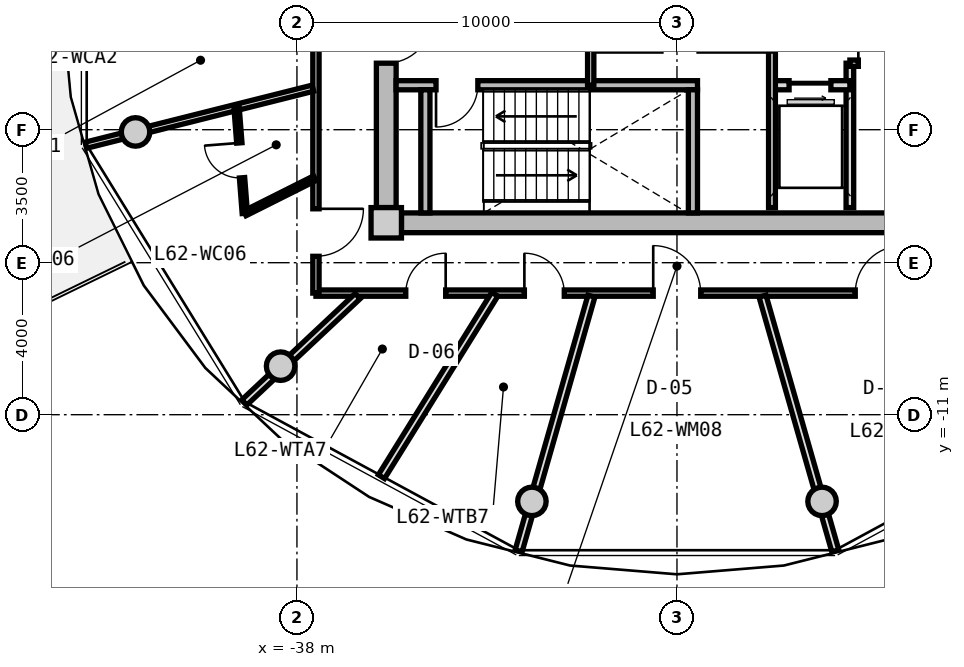
"""IFC4 building model, lengths in metres.
Left out: names, types, materials, properties, quantities, classifications, styles, units other than length and angle.
Written with IfcOpenShell. Run it as: python <this file> out.ifc"""

import sys

from ifc_helpers import new_model, si_unit, direction, frame, frame_2d, origin, origin_2d, place, context, subcontext, project, spatial, rectangle, circle, extrude, source, transform, mapped, element, fill, save


model = new_model("IFC4")
c1 = context("Model", 3, precision=1e-05, world=origin(), true_north=direction((0.0, 1.0)))
c2 = subcontext(c1, "Body", "Model", "MODEL_VIEW")
j1 = project(units=[si_unit("LENGTHUNIT", "METRE"), si_unit("PLANEANGLEUNIT", "RADIAN")], contexts=[c1])
p1 = place(None, origin())
s1 = spatial("IfcSite", under=j1, at=p1, CompositionType="ELEMENT")
p2 = place(p1, origin())
s2 = spatial("IfcBuilding", under=s1, at=p2, CompositionType="ELEMENT")
p3 = place(p2, frame((0.0, 0.0, 199.8)))
s3 = spatial("IfcBuildingStorey", under=s2, at=p3, CompositionType="ELEMENT", Elevation=199.8)
m1 = source(origin(), c2, "Body", "SweptSolid", [
    extrude(rectangle(XDim=0.8, YDim=0.8, at=origin_2d()), origin(), (0.0, 0.0, 1.0), 4.0),
])
p4 = place(p3, frame((-35.65, -5.95, 0.0), z_axis=(0.0, 0.0, 1.0), x_axis=(1.0, 0.0, 0.0)))
e1 = element("IfcColumn", 1, at=p4, inside=s3, PredefinedType="COLUMN", context=c2, shape_type="MappedRepresentation", body=[
    mapped(m1, transform((0.0, 0.0, 0.0), x_axis=(1.0, 0.0, 0.0), y_axis=(0.0, 1.0, 0.0), z_axis=(0.0, 0.0, 1.0), scale=1.0)),
])
m2 = source(origin(), c2, "Body", "SweptSolid", [
    extrude(rectangle(XDim=14.5, YDim=0.52, at=frame_2d((7.25, 0.0))), origin(), (0.0, 0.0, 1.0), 3.71),
])
p5 = place(p3, frame((-20.75, -5.95, 0.0), z_axis=(0.0, 0.0, 1.0), x_axis=(-1.0, 0.0, 0.0)))
e2 = element("IfcWall", 2, at=p5, inside=s3, PredefinedType="SHEAR", context=c2, shape_type="MappedRepresentation", body=[
    mapped(m2, transform((0.0, 0.0, 0.0), x_axis=(1.0, 0.0, 0.0), y_axis=(0.0, 1.0, 0.0), z_axis=(0.0, 0.0, 1.0), scale=1.0)),
])
m3 = source(origin(), c2, "Body", "SweptSolid", [
    extrude(rectangle(XDim=11.1, YDim=0.52, at=frame_2d((5.55, 0.0))), origin(), (0.0, 0.0, 1.0), 3.71),
])
p6 = place(p3, frame((-35.65, -5.55, 0.0), z_axis=(0.0, 0.0, 1.0), x_axis=(0.0, 1.0, 0.0)))
e3 = element("IfcWall", 3, at=p6, inside=s3, PredefinedType="SHEAR", context=c2, shape_type="MappedRepresentation", body=[
    mapped(m3, transform((0.0, 0.0, 0.0), x_axis=(1.0, 0.0, 0.0), y_axis=(0.0, 1.0, 0.0), z_axis=(0.0, 0.0, 1.0), scale=1.0)),
])
p7 = place(p6, frame((3.8, 0.0, 0.0)))
e4 = element("IfcOpeningElement", 4, at=p7, cuts=e3, PredefinedType="OPENING", context=c2, shape_type="SweptSolid", body=[
    extrude(rectangle(XDim=1.2, YDim=2.15, at=frame_2d((0.6, 1.075))), frame((0.0, 0.27, 0.0), z_axis=(0.0, -1.0, 0.0), x_axis=(1.0, 0.0, 0.0)), (0.0, 0.0, 1.0), 0.54),
])
m4 = source(origin(), c2, "Body", "SweptSolid", [
    extrude(circle(Radius=0.375, at=origin_2d()), origin(), (0.0, 0.0, 1.0), 4.0),
])
for number, where, z_axis, x_axis in (
    (5, (-42.247, -3.559, 0.0), (0.0, 0.0, 1.0), (1.0, 0.0, 0.0)),
    (6, (-38.43, -9.723, 0.0), (0.0, 0.0, 1.0), (1.0, 0.0, 0.0)),
    (7, (-31.818, -13.281, 0.0), (0.0, 0.0, 1.0), (1.0, 0.0, 0.0)),
    (8, (-24.182, -13.281, 0.0), (0.0, 0.0, 1.0), (1.0, 0.0, 0.0)),
):
    element("IfcColumn", number, at=place(p3, frame(where, z_axis=z_axis, x_axis=x_axis)), inside=s3, PredefinedType="COLUMN", context=c2, shape_type="MappedRepresentation", body=[
        mapped(m4, transform((0.0, 0.0, 0.0), x_axis=(1.0, 0.0, 0.0), y_axis=(0.0, 1.0, 0.0), z_axis=(0.0, 0.0, 1.0), scale=1.0)),
    ])
m5 = source(origin(), c2, "Body", "SweptSolid", [
    extrude(rectangle(XDim=7.93, YDim=0.24, at=frame_2d((3.965, 0.0))), origin(), (0.0, 0.0, 1.0), 3.71),
])
p8 = place(p3, frame((-35.39, -2.33, 0.0), z_axis=(0.0, 0.0, 1.0), x_axis=(1.0, 0.0, 0.0)))
e9 = element("IfcWall", 9, at=p8, inside=s3, PredefinedType="PARTITIONING", context=c2, shape_type="MappedRepresentation", body=[
    mapped(m5, transform((0.0, 0.0, 0.0), x_axis=(1.0, 0.0, 0.0), y_axis=(0.0, 1.0, 0.0), z_axis=(0.0, 0.0, 1.0), scale=1.0)),
])
p9 = place(p8, frame((1.05, 0.0, 0.0)))
e10 = element("IfcOpeningElement", 10, at=p9, cuts=e9, PredefinedType="OPENING", context=c2, shape_type="SweptSolid", body=[
    extrude(rectangle(XDim=1.1, YDim=2.15, at=frame_2d((0.55, 1.075))), frame((0.0, 0.13, 0.0), z_axis=(0.0, -1.0, 0.0), x_axis=(1.0, 0.0, 0.0)), (0.0, 0.0, 1.0), 0.26),
])
m6 = source(origin(), c2, "Body", "SweptSolid", [
    extrude(rectangle(XDim=3.24, YDim=0.24, at=frame_2d((1.62, 0.0))), origin(), (0.0, 0.0, 1.0), 3.71),
])
for number, where, z_axis, x_axis in (
    (11, (-34.62, -5.69, 0.0), (0.0, 0.0, 1.0), (0.0, 1.0, 0.0)),
    (12, (-27.58, -5.69, 0.0), (0.0, 0.0, 1.0), (0.0, 1.0, 0.0)),
):
    element("IfcWall", number, at=place(p3, frame(where, z_axis=z_axis, x_axis=x_axis)), inside=s3, PredefinedType="PARTITIONING", context=c2, shape_type="MappedRepresentation", body=[
        mapped(m6, transform((0.0, 0.0, 0.0), x_axis=(1.0, 0.0, 0.0), y_axis=(0.0, 1.0, 0.0), z_axis=(0.0, 0.0, 1.0), scale=1.0)),
    ])
m7 = source(origin(), c2, "Body", "SweptSolid", [
    extrude(rectangle(XDim=3.8, YDim=0.2, at=frame_2d((1.9, 0.0))), origin(), (0.0, 0.0, 1.0), 3.695),
])
p10 = place(p3, frame((-23.45, -5.55, 0.0), z_axis=(0.0, 0.0, 1.0), x_axis=(0.0, 1.0, 0.0)))
e13 = element("IfcWall", 13, at=p10, inside=s3, PredefinedType="PARTITIONING", context=c2, shape_type="MappedRepresentation", body=[
    mapped(m7, transform((0.0, 0.0, 0.0), x_axis=(1.0, 0.0, 0.0), y_axis=(0.0, 1.0, 0.0), z_axis=(0.0, 0.0, 1.0), scale=1.0)),
])
m8 = source(origin(), c2, "Body", "SweptSolid", [
    extrude(rectangle(XDim=2.05, YDim=0.24, at=frame_2d((1.025, 0.0))), origin(), (0.0, 0.0, 1.0), 3.695),
])
p11 = place(p3, frame((-25.5, -2.33, 0.0), z_axis=(0.0, 0.0, 1.0), x_axis=(1.0, 0.0, 0.0)))
e14 = element("IfcWall", 14, at=p11, inside=s3, PredefinedType="PARTITIONING", context=c2, shape_type="MappedRepresentation", body=[
    mapped(m8, transform((0.0, 0.0, 0.0), x_axis=(1.0, 0.0, 0.0), y_axis=(0.0, 1.0, 0.0), z_axis=(0.0, 0.0, 1.0), scale=1.0)),
])
p12 = place(p11, frame((0.45, 0.0, 0.0)))
e15 = element("IfcOpeningElement", 15, at=p12, cuts=e14, PredefinedType="OPENING", context=c2, shape_type="SweptSolid", body=[
    extrude(rectangle(XDim=1.1, YDim=2.2, at=frame_2d((0.55, 1.1))), frame((0.0, 0.13, 0.0), z_axis=(0.0, -1.0, 0.0), x_axis=(1.0, 0.0, 0.0)), (0.0, 0.0, 1.0), 0.26),
])
m9 = source(origin(), c2, "Body", "SweptSolid", [
    extrude(rectangle(XDim=4.2, YDim=0.18, at=frame_2d((2.1, 0.0))), origin(), (0.0, 0.0, 1.0), 3.695),
])
p13 = place(p3, frame((-25.5, -5.55, 0.0), z_axis=(0.0, 0.0, 1.0), x_axis=(0.0, 1.0, 0.0)))
e16 = element("IfcWall", 16, at=p13, inside=s3, PredefinedType="PARTITIONING", context=c2, shape_type="MappedRepresentation", body=[
    mapped(m9, transform((0.0, 0.0, 0.0), x_axis=(1.0, 0.0, 0.0), y_axis=(0.0, 1.0, 0.0), z_axis=(0.0, 0.0, 1.0), scale=1.0)),
])
m10 = source(origin(), c2, "Body", "SweptSolid", [
    extrude(rectangle(XDim=0.98, YDim=0.165, at=frame_2d((0.49, 0.0))), origin(), (0.0, 0.0, 1.0), 3.695),
])
p14 = place(p3, frame((-30.27, -2.33, 0.0), z_axis=(0.0, 0.0, 1.0), x_axis=(0.0, 1.0, 0.0)))
e17 = element("IfcWall", 17, at=p14, inside=s3, PredefinedType="PARTITIONING", context=c2, shape_type="MappedRepresentation", body=[
    mapped(m10, transform((0.0, 0.0, 0.0), x_axis=(1.0, 0.0, 0.0), y_axis=(0.0, 1.0, 0.0), z_axis=(0.0, 0.0, 1.0), scale=1.0)),
])
m11 = source(origin(), c2, "Body", "SweptSolid", [
    extrude(rectangle(XDim=2.7, YDim=0.165, at=frame_2d((1.35, 0.0))), origin(), (0.0, 0.0, 1.0), 3.695),
])
p15 = place(p3, frame((-23.45, -1.75, 0.0), z_axis=(0.0, 0.0, 1.0), x_axis=(1.0, 0.0, 0.0)))
e18 = element("IfcWall", 18, at=p15, inside=s3, PredefinedType="PARTITIONING", context=c2, shape_type="MappedRepresentation", body=[
    mapped(m11, transform((0.0, 0.0, 0.0), x_axis=(1.0, 0.0, 0.0), y_axis=(0.0, 1.0, 0.0), z_axis=(0.0, 0.0, 1.0), scale=1.0)),
])
p16 = place(p15, frame((0.222, 0.0, 0.0)))
e19 = element("IfcOpeningElement", 19, at=p16, cuts=e18, PredefinedType="OPENING", context=c2, shape_type="SweptSolid", body=[
    extrude(rectangle(XDim=0.925, YDim=2.1, at=frame_2d((0.462, 1.05))), frame((0.0, 0.093, 0.0), z_axis=(0.0, -1.0, 0.0), x_axis=(1.0, 0.0, 0.0)), (0.0, 0.0, 1.0), 0.185),
])
p17 = place(p15, frame((1.522, 0.0, 0.0)))
e20 = element("IfcOpeningElement", 20, at=p17, cuts=e18, PredefinedType="OPENING", context=c2, shape_type="SweptSolid", body=[
    extrude(rectangle(XDim=0.925, YDim=2.1, at=frame_2d((0.462, 1.05))), frame((0.0, 0.093, 0.0), z_axis=(0.0, -1.0, 0.0), x_axis=(1.0, 0.0, 0.0)), (0.0, 0.0, 1.0), 0.185),
])
m12 = source(origin(), c2, "Body", "SweptSolid", [
    extrude(rectangle(XDim=19.0, YDim=0.165, at=frame_2d((9.5, 0.0))), origin(), (0.0, 0.0, 1.0), 3.695),
])
p18 = place(p3, frame((-18.5, -7.8, 0.0), z_axis=(0.0, 0.0, 1.0), x_axis=(-1.0, 0.0, 0.0)))
e21 = element("IfcWall", 21, at=p18, inside=s3, PredefinedType="PARTITIONING", context=c2, shape_type="MappedRepresentation", body=[
    mapped(m12, transform((0.0, 0.0, 0.0), x_axis=(1.0, 0.0, 0.0), y_axis=(0.0, 1.0, 0.0), z_axis=(0.0, 0.0, 1.0), scale=1.0)),
])
p19 = place(p18, frame((15.586, 0.0, 0.0)))
e22 = element("IfcOpeningElement", 22, at=p19, cuts=e21, PredefinedType="OPENING", context=c2, shape_type="SweptSolid", body=[
    extrude(rectangle(XDim=1.05, YDim=2.15, at=frame_2d((0.525, 1.075))), frame((0.0, 0.093, 0.0), z_axis=(0.0, -1.0, 0.0), x_axis=(1.0, 0.0, 0.0)), (0.0, 0.0, 1.0), 0.185),
])
p20 = place(p18, frame((12.465, 0.0, 0.0)))
e23 = element("IfcOpeningElement", 23, at=p20, cuts=e21, PredefinedType="OPENING", context=c2, shape_type="SweptSolid", body=[
    extrude(rectangle(XDim=1.05, YDim=2.15, at=frame_2d((0.525, 1.075))), frame((0.0, 0.093, 0.0), z_axis=(0.0, -1.0, 0.0), x_axis=(1.0, 0.0, 0.0)), (0.0, 0.0, 1.0), 0.185),
])
p21 = place(p18, frame((8.875, 0.0, 0.0)))
e24 = element("IfcOpeningElement", 24, at=p21, cuts=e21, PredefinedType="OPENING", context=c2, shape_type="SweptSolid", body=[
    extrude(rectangle(XDim=1.25, YDim=2.2, at=frame_2d((0.625, 1.1))), frame((0.0, 0.093, 0.0), z_axis=(0.0, -1.0, 0.0), x_axis=(1.0, 0.0, 0.0)), (0.0, 0.0, 1.0), 0.185),
])
p22 = place(p18, frame((3.559, 0.0, 0.0)))
e25 = element("IfcOpeningElement", 25, at=p22, cuts=e21, PredefinedType="OPENING", context=c2, shape_type="SweptSolid", body=[
    extrude(rectangle(XDim=1.25, YDim=2.2, at=frame_2d((0.625, 1.1))), frame((0.0, 0.093, 0.0), z_axis=(0.0, -1.0, 0.0), x_axis=(1.0, 0.0, 0.0)), (0.0, 0.0, 1.0), 0.185),
])
m13 = source(origin(), c2, "Body", "SweptSolid", [
    extrude(rectangle(XDim=6.88, YDim=0.165, at=frame_2d((3.44, 0.0))), origin(), (0.0, 0.0, 1.0), 3.695),
])
p23 = place(p3, frame((-37.5, -7.8, 0.0), z_axis=(0.0, 0.0, 1.0), x_axis=(0.0, 1.0, 0.0)))
e26 = element("IfcWall", 26, at=p23, inside=s3, PredefinedType="PARTITIONING", context=c2, shape_type="MappedRepresentation", body=[
    mapped(m13, transform((0.0, 0.0, 0.0), x_axis=(1.0, 0.0, 0.0), y_axis=(0.0, 1.0, 0.0), z_axis=(0.0, 0.0, 1.0), scale=1.0)),
])
p24 = place(p23, frame((0.968, 0.0, 0.0)))
e27 = element("IfcOpeningElement", 27, at=p24, cuts=e26, PredefinedType="OPENING", context=c2, shape_type="SweptSolid", body=[
    extrude(rectangle(XDim=1.25, YDim=2.2, at=frame_2d((0.625, 1.1))), frame((0.0, 0.093, 0.0), z_axis=(0.0, -1.0, 0.0), x_axis=(1.0, 0.0, 0.0)), (0.0, 0.0, 1.0), 0.185),
])
m14 = source(origin(), c2, "Body", "SweptSolid", [
    extrude(rectangle(XDim=6.157, YDim=0.165, at=frame_2d((3.079, 0.0))), origin(), (0.0, 0.0, 1.0), 3.295),
])
p25 = place(p3, frame((-37.58, -2.407, 0.0), z_axis=(0.0, 0.0, 1.0), x_axis=(-0.969840867184, -0.243738984038, 0.0)))
e28 = element("IfcWall", 28, at=p25, inside=s3, PredefinedType="PARTITIONING", context=c2, shape_type="MappedRepresentation", body=[
    mapped(m14, transform((0.0, 0.0, 0.0), x_axis=(1.0, 0.0, 0.0), y_axis=(0.0, 1.0, 0.0), z_axis=(0.0, 0.0, 1.0), scale=1.0)),
])
m15 = source(origin(), c2, "Body", "SweptSolid", [
    extrude(rectangle(XDim=4.089, YDim=0.19, at=frame_2d((2.044, 0.0))), origin(), (0.0, 0.0, 1.0), 3.295),
])
p26 = place(p3, frame((-36.402, -7.88, 0.0), z_axis=(0.0, 0.0, 1.0), x_axis=(-0.729401273609, -0.684086092577, 0.0)))
e29 = element("IfcWall", 29, at=p26, inside=s3, PredefinedType="PARTITIONING", context=c2, shape_type="MappedRepresentation", body=[
    mapped(m15, transform((0.0, 0.0, 0.0), x_axis=(1.0, 0.0, 0.0), y_axis=(0.0, 1.0, 0.0), z_axis=(0.0, 0.0, 1.0), scale=1.0)),
])
m16 = source(origin(), c2, "Body", "SweptSolid", [
    extrude(rectangle(XDim=2.06, YDim=0.14, at=frame_2d((1.03, 0.0))), origin(), (0.0, 0.0, 1.0), 3.695),
])
p27 = place(p3, frame((-37.53, -4.778, 0.0), z_axis=(0.0, 0.0, 1.0), x_axis=(-0.893952568722, -0.448161583444, 0.0)))
e30 = element("IfcWall", 30, at=p27, inside=s3, PredefinedType="PARTITIONING", context=c2, shape_type="MappedRepresentation", body=[
    mapped(m16, transform((0.0, 0.0, 0.0), x_axis=(1.0, 0.0, 0.0), y_axis=(0.0, 1.0, 0.0), z_axis=(0.0, 0.0, 1.0), scale=1.0)),
])
m17 = source(origin(), c2, "Body", "SweptSolid", [
    extrude(rectangle(XDim=2.798, YDim=0.14, at=frame_2d((1.399, 0.0))), origin(), (0.0, 0.0, 1.0), 3.695),
])
p28 = place(p3, frame((-39.371, -5.701, 0.0), z_axis=(0.0, 0.0, 1.0), x_axis=(-0.077823984089, 0.996967114553, 0.0)))
e31 = element("IfcWall", 31, at=p28, inside=s3, PredefinedType="PARTITIONING", context=c2, shape_type="MappedRepresentation", body=[
    mapped(m17, transform((0.0, 0.0, 0.0), x_axis=(1.0, 0.0, 0.0), y_axis=(0.0, 1.0, 0.0), z_axis=(0.0, 0.0, 1.0), scale=1.0)),
])
p29 = place(p28, frame((0.939, 0.0, 0.0)))
e32 = element("IfcOpeningElement", 32, at=p29, cuts=e31, PredefinedType="OPENING", context=c2, shape_type="SweptSolid", body=[
    extrude(rectangle(XDim=0.92, YDim=2.1, at=frame_2d((0.46, 1.05))), frame((0.0, 0.08, 0.0), z_axis=(0.0, -1.0, 0.0), x_axis=(1.0, 0.0, 0.0)), (0.0, 0.0, 1.0), 0.16),
])
m18 = source(origin(), c2, "Body", "SweptSolid", [
    extrude(rectangle(XDim=6.974, YDim=0.19, at=frame_2d((3.487, 0.0))), origin(), (0.0, 0.0, 1.0), 3.295),
])
p30 = place(p3, frame((-30.251, -7.88, 0.0), z_axis=(0.0, 0.0, 1.0), x_axis=(-0.274707256801, -0.961527910703, 0.0)))
e33 = element("IfcWall", 33, at=p30, inside=s3, PredefinedType="PARTITIONING", context=c2, shape_type="MappedRepresentation", body=[
    mapped(m18, transform((0.0, 0.0, 0.0), x_axis=(1.0, 0.0, 0.0), y_axis=(0.0, 1.0, 0.0), z_axis=(0.0, 0.0, 1.0), scale=1.0)),
])
m19 = source(origin(), c2, "Body", "SweptSolid", [
    extrude(rectangle(XDim=5.652, YDim=0.19, at=frame_2d((2.826, 0.0))), origin(), (0.0, 0.0, 1.0), 3.695),
])
p31 = place(p3, frame((-32.794, -7.83, 0.0), z_axis=(0.0, 0.0, 1.0), x_axis=(-0.527566076956, -0.84951399897, 0.0)))
e34 = element("IfcWall", 34, at=p31, inside=s3, PredefinedType="PARTITIONING", context=c2, shape_type="MappedRepresentation", body=[
    mapped(m19, transform((0.0, 0.0, 0.0), x_axis=(1.0, 0.0, 0.0), y_axis=(0.0, 1.0, 0.0), z_axis=(0.0, 0.0, 1.0), scale=1.0)),
])
p32 = place(p3, frame((-25.749, -7.88, 0.0), z_axis=(0.0, 0.0, 1.0), x_axis=(0.274707256801, -0.961527910703, 0.0)))
e35 = element("IfcWall", 35, at=p32, inside=s3, PredefinedType="PARTITIONING", context=c2, shape_type="MappedRepresentation", body=[
    mapped(m18, transform((0.0, 0.0, 0.0), x_axis=(1.0, 0.0, 0.0), y_axis=(0.0, 1.0, 0.0), z_axis=(0.0, 0.0, 1.0), scale=1.0)),
])
m20 = source(origin(), c2, "Body", "SweptSolid", [
    extrude(rectangle(XDim=1.1, YDim=2.15, at=frame_2d((0.55, 1.075))), frame((0.0, 0.025, 0.0), z_axis=(0.0, -1.0, 0.0), x_axis=(1.0, 0.0, 0.0)), (0.0, 0.0, 1.0), 0.05),
])
p33 = place(p9, frame((1.1, 0.0, 0.0), z_axis=(0.0, 0.0, 1.0), x_axis=(-1.0, 0.0, 0.0)))
e36 = element("IfcDoor", 36, at=p33, inside=s3, OperationType="SINGLE_SWING_RIGHT", PredefinedType="DOOR", context=c2, shape_type="MappedRepresentation", body=[
    mapped(m20, transform((0.0, 0.0, 0.0), x_axis=(1.0, 0.0, 0.0), y_axis=(0.0, 1.0, 0.0), z_axis=(0.0, 0.0, 1.0), scale=1.0)),
])
fill(e10, e36)
m21 = source(origin(), c2, "Body", "SweptSolid", [
    extrude(rectangle(XDim=1.2, YDim=2.15, at=frame_2d((0.6, 1.075))), frame((0.0, 0.025, 0.0), z_axis=(0.0, -1.0, 0.0), x_axis=(1.0, 0.0, 0.0)), (0.0, 0.0, 1.0), 0.05),
])
p34 = place(p7, frame((1.2, 0.0, 0.0), z_axis=(0.0, 0.0, 1.0), x_axis=(-1.0, 0.0, 0.0)))
e37 = element("IfcDoor", 37, at=p34, inside=s3, OperationType="SINGLE_SWING_LEFT", PredefinedType="DOOR", context=c2, shape_type="MappedRepresentation", body=[
    mapped(m21, transform((0.0, 0.0, 0.0), x_axis=(1.0, 0.0, 0.0), y_axis=(0.0, 1.0, 0.0), z_axis=(0.0, 0.0, 1.0), scale=1.0)),
])
fill(e4, e37)
m22 = source(origin(), c2, "Body", "SweptSolid", [
    extrude(rectangle(XDim=1.1, YDim=2.2, at=frame_2d((0.55, 1.1))), frame((0.0, 0.025, 0.0), z_axis=(0.0, -1.0, 0.0), x_axis=(1.0, 0.0, 0.0)), (0.0, 0.0, 1.0), 0.05),
])
p35 = place(p12, frame((1.1, 0.0, 0.0), z_axis=(0.0, 0.0, 1.0), x_axis=(-1.0, 0.0, 0.0)))
e38 = element("IfcDoor", 38, at=p35, inside=s3, OperationType="SLIDING_TO_RIGHT", PredefinedType="DOOR", context=c2, shape_type="MappedRepresentation", body=[
    mapped(m22, transform((0.0, 0.0, 0.0), x_axis=(1.0, 0.0, 0.0), y_axis=(0.0, 1.0, 0.0), z_axis=(0.0, 0.0, 1.0), scale=1.0)),
])
fill(e15, e38)
m23 = source(origin(), c2, "Body", "SweptSolid", [
    extrude(rectangle(XDim=0.925, YDim=2.1, at=frame_2d((0.462, 1.05))), frame((0.0, 0.025, 0.0), z_axis=(0.0, -1.0, 0.0), x_axis=(1.0, 0.0, 0.0)), (0.0, 0.0, 1.0), 0.05),
])
p36 = place(p16, origin())
e39 = element("IfcDoor", 39, at=p36, inside=s3, OperationType="SINGLE_SWING_LEFT", PredefinedType="DOOR", context=c2, shape_type="MappedRepresentation", body=[
    mapped(m23, transform((0.0, 0.0, 0.0), x_axis=(1.0, 0.0, 0.0), y_axis=(0.0, 1.0, 0.0), z_axis=(0.0, 0.0, 1.0), scale=1.0)),
])
fill(e19, e39)
m24 = source(origin(), c2, "Body", "SweptSolid", [
    extrude(rectangle(XDim=1.25, YDim=2.2, at=frame_2d((0.625, 1.1))), frame((0.0, 0.025, 0.0), z_axis=(0.0, -1.0, 0.0), x_axis=(1.0, 0.0, 0.0)), (0.0, 0.0, 1.0), 0.05),
])
p37 = place(p24, frame((1.25, 0.0, 0.0), z_axis=(0.0, 0.0, 1.0), x_axis=(-1.0, 0.0, 0.0)))
e40 = element("IfcDoor", 40, at=p37, inside=s3, OperationType="SINGLE_SWING_LEFT", PredefinedType="DOOR", context=c2, shape_type="MappedRepresentation", body=[
    mapped(m24, transform((0.0, 0.0, 0.0), x_axis=(1.0, 0.0, 0.0), y_axis=(0.0, 1.0, 0.0), z_axis=(0.0, 0.0, 1.0), scale=1.0)),
])
fill(e27, e40)
m25 = source(origin(), c2, "Body", "SweptSolid", [
    extrude(rectangle(XDim=0.92, YDim=2.1, at=frame_2d((0.46, 1.05))), frame((0.0, 0.025, 0.0), z_axis=(0.0, -1.0, 0.0), x_axis=(1.0, 0.0, 0.0)), (0.0, 0.0, 1.0), 0.05),
])
p38 = place(p29, origin())
e41 = element("IfcDoor", 41, at=p38, inside=s3, OperationType="SINGLE_SWING_RIGHT", PredefinedType="DOOR", context=c2, shape_type="MappedRepresentation", body=[
    mapped(m25, transform((0.0, 0.0, 0.0), x_axis=(1.0, 0.0, 0.0), y_axis=(0.0, 1.0, 0.0), z_axis=(0.0, 0.0, 1.0), scale=1.0)),
])
fill(e32, e41)
m26 = source(origin(), c2, "Body", "SweptSolid", [
    extrude(rectangle(XDim=1.05, YDim=2.15, at=frame_2d((0.525, 1.075))), frame((0.0, 0.025, 0.0), z_axis=(0.0, -1.0, 0.0), x_axis=(1.0, 0.0, 0.0)), (0.0, 0.0, 1.0), 0.05),
])
p39 = place(p19, frame((1.05, 0.0, 0.0), z_axis=(0.0, 0.0, 1.0), x_axis=(-1.0, 0.0, 0.0)))
e42 = element("IfcDoor", 42, at=p39, inside=s3, OperationType="SINGLE_SWING_RIGHT", PredefinedType="DOOR", context=c2, shape_type="MappedRepresentation", body=[
    mapped(m26, transform((0.0, 0.0, 0.0), x_axis=(1.0, 0.0, 0.0), y_axis=(0.0, 1.0, 0.0), z_axis=(0.0, 0.0, 1.0), scale=1.0)),
])
fill(e22, e42)
p40 = place(p20, frame((1.05, 0.0, 0.0), z_axis=(0.0, 0.0, 1.0), x_axis=(-1.0, 0.0, 0.0)))
e43 = element("IfcDoor", 43, at=p40, inside=s3, OperationType="SINGLE_SWING_LEFT", PredefinedType="DOOR", context=c2, shape_type="MappedRepresentation", body=[
    mapped(m26, transform((0.0, 0.0, 0.0), x_axis=(1.0, 0.0, 0.0), y_axis=(0.0, 1.0, 0.0), z_axis=(0.0, 0.0, 1.0), scale=1.0)),
])
fill(e23, e43)
p41 = place(p21, frame((1.25, 0.0, 0.0), z_axis=(0.0, 0.0, 1.0), x_axis=(-1.0, 0.0, 0.0)))
e44 = element("IfcDoor", 44, at=p41, inside=s3, OperationType="SINGLE_SWING_LEFT", PredefinedType="DOOR", context=c2, shape_type="MappedRepresentation", body=[
    mapped(m24, transform((0.0, 0.0, 0.0), x_axis=(1.0, 0.0, 0.0), y_axis=(0.0, 1.0, 0.0), z_axis=(0.0, 0.0, 1.0), scale=1.0)),
])
fill(e24, e44)
p42 = place(p22, frame((1.25, 0.0, 0.0), z_axis=(0.0, 0.0, 1.0), x_axis=(-1.0, 0.0, 0.0)))
e45 = element("IfcDoor", 45, at=p42, inside=s3, OperationType="SINGLE_SWING_RIGHT", PredefinedType="DOOR", context=c2, shape_type="MappedRepresentation", body=[
    mapped(m24, transform((0.0, 0.0, 0.0), x_axis=(1.0, 0.0, 0.0), y_axis=(0.0, 1.0, 0.0), z_axis=(0.0, 0.0, 1.0), scale=1.0)),
])
fill(e25, e45)
save(model, sys.argv[1])
